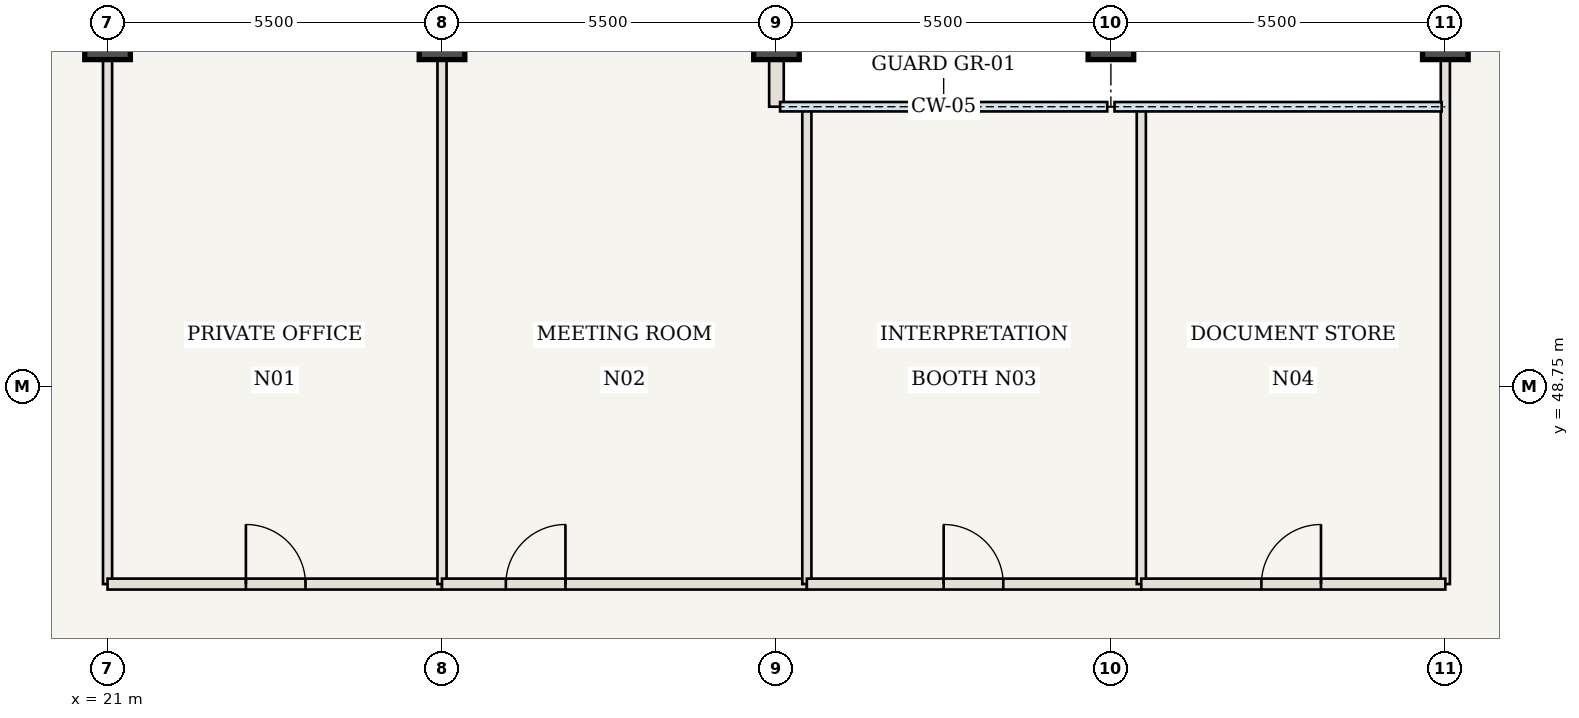
"""IFC4 building model, lengths in metres.
Left out: names, types, materials, properties, quantities, classifications, styles, units other than length and angle.
Written with IfcOpenShell. Run it as: python <this file> out.ifc"""

import sys

from ifc_helpers import new_model, si_unit, direction, frame, frame_2d, origin, origin_2d, place, context, subcontext, project, spatial, rectangle, extrude, element, fill, save


model = new_model("IFC4")
c1 = context("Model", 3, precision=1e-05, world=origin(), true_north=direction((0.0, 1.0)))
c2 = subcontext(c1, "Body", "Model", "MODEL_VIEW")
j1 = project(units=[si_unit("LENGTHUNIT", "METRE"), si_unit("PLANEANGLEUNIT", "RADIAN")], contexts=[c1])
p1 = place(None, origin())
s1 = spatial("IfcSite", under=j1, at=p1, CompositionType="ELEMENT")
p2 = place(p1, origin())
s2 = spatial("IfcBuilding", under=s1, at=p2, CompositionType="ELEMENT")
p3 = place(p2, frame((0.0, 0.0, 273.7)))
s3 = spatial("IfcBuildingStorey", under=s2, at=p3, CompositionType="ELEMENT", Elevation=273.7)
for number, where, z_axis, x_axis in (
    (1, (21.0, 54.5, 0.0), (0.0, 0.0, 1.0), (1.0, 0.0, 0.0)),
    (2, (26.5, 54.5, 0.0), (0.0, 0.0, 1.0), (1.0, 0.0, 0.0)),
    (3, (32.0, 54.5, 0.0), (0.0, 0.0, 1.0), (1.0, 0.0, 0.0)),
    (4, (37.5, 54.5, 0.0), (0.0, 0.0, 1.0), (1.0, 0.0, 0.0)),
    (5, (43.0, 54.5, 0.0), (0.0, 0.0, 1.0), (1.0, 0.0, 0.0)),
):
    element("IfcColumn", number, at=place(p3, frame(where, z_axis=z_axis, x_axis=x_axis)), inside=s3, PredefinedType="COLUMN", context=c2, shape_type="SweptSolid", body=[
        extrude(rectangle(XDim=0.75, YDim=0.75, at=origin_2d()), origin(), (0.0, 0.0, 1.0), 3.85),
    ])
for number, where, z_axis, x_axis in (
    (6, (21.0, 45.5, 0.0), (0.0, 0.0, 1.0), (0.0, 1.0, 0.0)),
    (7, (43.0, 45.5, 0.0), (0.0, 0.0, 1.0), (0.0, 1.0, 0.0)),
):
    element("IfcWall", number, at=place(p3, frame(where, z_axis=z_axis, x_axis=x_axis)), inside=s3, PredefinedType="STANDARD", context=c2, shape_type="SweptSolid", body=[
        extrude(rectangle(XDim=8.94, YDim=0.15, at=frame_2d((4.47, 0.0))), origin(), (0.0, 0.0, 1.0), 3.685),
    ])
p4 = place(p3, frame((21.0, 45.5, 0.0), z_axis=(0.0, 0.0, 1.0), x_axis=(1.0, 0.0, 0.0)))
e8 = element("IfcWall", 8, at=p4, inside=s3, PredefinedType="STANDARD", context=c2, shape_type="SweptSolid", body=[
    extrude(rectangle(XDim=5.5, YDim=0.18, at=frame_2d((2.75, 0.0))), origin(), (0.0, 0.0, 1.0), 3.685),
])
p5 = place(p4, frame((2.275, 0.0, 0.0)))
e9 = element("IfcOpeningElement", 9, at=p5, cuts=e8, PredefinedType="OPENING", context=c2, shape_type="SweptSolid", body=[
    extrude(rectangle(XDim=0.98, YDim=2.2, at=frame_2d((0.49, 1.1))), frame((0.0, 0.1, 0.0), z_axis=(0.0, -1.0, 0.0), x_axis=(1.0, 0.0, 0.0)), (0.0, 0.0, 1.0), 0.2),
])
p6 = place(p3, frame((26.5, 45.5, 0.0), z_axis=(0.0, 0.0, 1.0), x_axis=(0.0, 1.0, 0.0)))
e10 = element("IfcWall", 10, at=p6, inside=s3, PredefinedType="STANDARD", context=c2, shape_type="SweptSolid", body=[
    extrude(rectangle(XDim=8.94, YDim=0.15, at=frame_2d((4.47, 0.0))), origin(), (0.0, 0.0, 1.0), 3.685),
])
p7 = place(p3, frame((26.5, 45.5, 0.0), z_axis=(0.0, 0.0, 1.0), x_axis=(1.0, 0.0, 0.0)))
e11 = element("IfcWall", 11, at=p7, inside=s3, PredefinedType="STANDARD", context=c2, shape_type="SweptSolid", body=[
    extrude(rectangle(XDim=6.0, YDim=0.18, at=frame_2d((3.0, 0.0))), origin(), (0.0, 0.0, 1.0), 3.685),
])
p8 = place(p7, frame((1.05, 0.0, 0.0)))
e12 = element("IfcOpeningElement", 12, at=p8, cuts=e11, PredefinedType="OPENING", context=c2, shape_type="SweptSolid", body=[
    extrude(rectangle(XDim=0.98, YDim=2.2, at=frame_2d((0.49, 1.1))), frame((0.0, 0.1, 0.0), z_axis=(0.0, -1.0, 0.0), x_axis=(1.0, 0.0, 0.0)), (0.0, 0.0, 1.0), 0.2),
])
p9 = place(p3, frame((32.5, 45.5, 0.0), z_axis=(0.0, 0.0, 1.0), x_axis=(0.0, 1.0, 0.0)))
e13 = element("IfcWall", 13, at=p9, inside=s3, PredefinedType="STANDARD", context=c2, shape_type="SweptSolid", body=[
    extrude(rectangle(XDim=7.84, YDim=0.15, at=frame_2d((3.92, 0.0))), origin(), (0.0, 0.0, 1.0), 3.685),
])
p10 = place(p3, frame((32.5, 45.5, 0.0), z_axis=(0.0, 0.0, 1.0), x_axis=(1.0, 0.0, 0.0)))
e14 = element("IfcWall", 14, at=p10, inside=s3, PredefinedType="STANDARD", context=c2, shape_type="SweptSolid", body=[
    extrude(rectangle(XDim=5.5, YDim=0.18, at=frame_2d((2.75, 0.0))), origin(), (0.0, 0.0, 1.0), 3.685),
])
p11 = place(p10, frame((2.25, 0.0, 0.0)))
e15 = element("IfcOpeningElement", 15, at=p11, cuts=e14, PredefinedType="OPENING", context=c2, shape_type="SweptSolid", body=[
    extrude(rectangle(XDim=0.98, YDim=2.2, at=frame_2d((0.49, 1.1))), frame((0.0, 0.1, 0.0), z_axis=(0.0, -1.0, 0.0), x_axis=(1.0, 0.0, 0.0)), (0.0, 0.0, 1.0), 0.2),
])
p12 = place(p3, frame((38.0, 45.5, 0.0), z_axis=(0.0, 0.0, 1.0), x_axis=(0.0, 1.0, 0.0)))
e16 = element("IfcWall", 16, at=p12, inside=s3, PredefinedType="STANDARD", context=c2, shape_type="SweptSolid", body=[
    extrude(rectangle(XDim=7.84, YDim=0.15, at=frame_2d((3.92, 0.0))), origin(), (0.0, 0.0, 1.0), 3.685),
])
p13 = place(p3, frame((38.0, 45.5, 0.0), z_axis=(0.0, 0.0, 1.0), x_axis=(1.0, 0.0, 0.0)))
e17 = element("IfcWall", 17, at=p13, inside=s3, PredefinedType="STANDARD", context=c2, shape_type="SweptSolid", body=[
    extrude(rectangle(XDim=5.0, YDim=0.18, at=frame_2d((2.5, 0.0))), origin(), (0.0, 0.0, 1.0), 3.685),
])
p14 = place(p13, frame((1.975, 0.0, 0.0)))
e18 = element("IfcOpeningElement", 18, at=p14, cuts=e17, PredefinedType="OPENING", context=c2, shape_type="SweptSolid", body=[
    extrude(rectangle(XDim=0.98, YDim=2.2, at=frame_2d((0.49, 1.1))), frame((0.0, 0.1, 0.0), z_axis=(0.0, -1.0, 0.0), x_axis=(1.0, 0.0, 0.0)), (0.0, 0.0, 1.0), 0.2),
])
p15 = place(p3, frame((32.0, 54.5, 0.0), z_axis=(0.0, 0.0, 1.0), x_axis=(0.0, -1.0, 0.0)))
e19 = element("IfcWall", 19, at=p15, inside=s3, PredefinedType="USERDEFINED", context=c2, shape_type="SweptSolid", body=[
    extrude(rectangle(XDim=1.15, YDim=0.24, at=frame_2d((0.575, 0.0))), origin(), (0.0, 0.0, 1.0), 2.985),
])
p16 = place(p5, origin())
e20 = element("IfcDoor", 20, at=p16, inside=s3, OperationType="SINGLE_SWING_LEFT", PredefinedType="DOOR", context=c2, shape_type="SweptSolid", body=[
    extrude(rectangle(XDim=0.98, YDim=2.2, at=frame_2d((0.49, 1.1))), frame((0.0, 0.025, 0.0), z_axis=(0.0, -1.0, 0.0), x_axis=(1.0, 0.0, 0.0)), (0.0, 0.0, 1.0), 0.05),
])
fill(e9, e20)
p17 = place(p8, origin())
e21 = element("IfcDoor", 21, at=p17, inside=s3, OperationType="SINGLE_SWING_RIGHT", PredefinedType="DOOR", context=c2, shape_type="SweptSolid", body=[
    extrude(rectangle(XDim=0.98, YDim=2.2, at=frame_2d((0.49, 1.1))), frame((0.0, 0.025, 0.0), z_axis=(0.0, -1.0, 0.0), x_axis=(1.0, 0.0, 0.0)), (0.0, 0.0, 1.0), 0.05),
])
fill(e12, e21)
p18 = place(p11, origin())
e22 = element("IfcDoor", 22, at=p18, inside=s3, OperationType="SINGLE_SWING_LEFT", PredefinedType="DOOR", context=c2, shape_type="SweptSolid", body=[
    extrude(rectangle(XDim=0.98, YDim=2.2, at=frame_2d((0.49, 1.1))), frame((0.0, 0.025, 0.0), z_axis=(0.0, -1.0, 0.0), x_axis=(1.0, 0.0, 0.0)), (0.0, 0.0, 1.0), 0.05),
])
fill(e15, e22)
p19 = place(p14, origin())
e23 = element("IfcDoor", 23, at=p19, inside=s3, OperationType="SINGLE_SWING_RIGHT", PredefinedType="DOOR", context=c2, shape_type="SweptSolid", body=[
    extrude(rectangle(XDim=0.98, YDim=2.2, at=frame_2d((0.49, 1.1))), frame((0.0, 0.025, 0.0), z_axis=(0.0, -1.0, 0.0), x_axis=(1.0, 0.0, 0.0)), (0.0, 0.0, 1.0), 0.05),
])
fill(e18, e23)
save(model, sys.argv[1])
